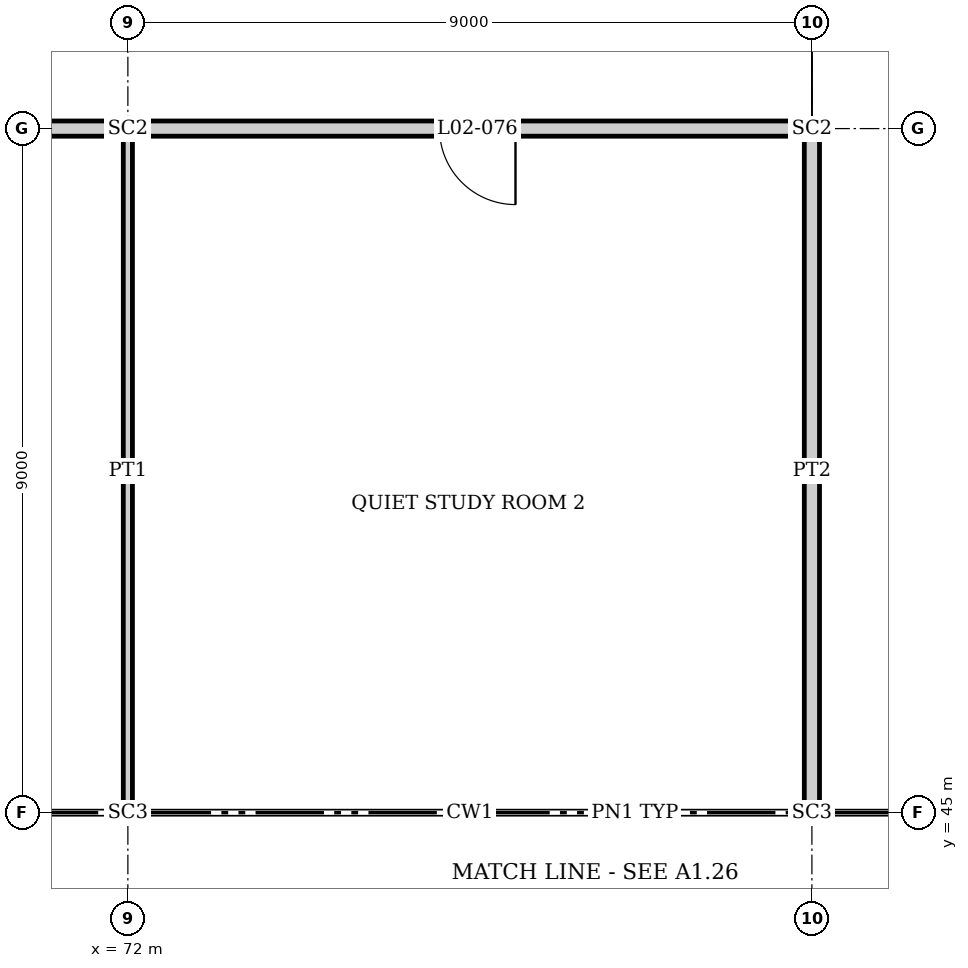
"""IFC4 building model, lengths in metres.
Left out: names, types, materials, properties, quantities, classifications, styles, units other than length and angle.
Written with IfcOpenShell. Run it as: python <this file> out.ifc"""

import sys

from ifc_helpers import new_model, si_unit, direction, frame, frame_2d, origin, origin_2d, place, context, subcontext, project, spatial, rectangle, i_section, extrude, element, fill, save


model = new_model("IFC4")
c1 = context("Model", 3, precision=1e-05, world=origin(), true_north=direction((0.0, 1.0)))
c2 = subcontext(c1, "Body", "Model", "MODEL_VIEW")
j1 = project(units=[si_unit("LENGTHUNIT", "METRE"), si_unit("PLANEANGLEUNIT", "RADIAN")], contexts=[c1])
p1 = place(None, origin())
s1 = spatial("IfcSite", under=j1, at=p1, CompositionType="ELEMENT")
p2 = place(p1, origin())
s2 = spatial("IfcBuilding", under=s1, at=p2, CompositionType="ELEMENT")
p3 = place(p2, frame((0.0, 0.0, 10.5)))
s3 = spatial("IfcBuildingStorey", under=s2, at=p3, CompositionType="ELEMENT", Elevation=10.5)
p4 = place(p3, frame((72.0, 45.0, 0.0), z_axis=(0.0, 0.0, 1.0), x_axis=(0.0, 1.0, 0.0)))
e1 = element("IfcColumn", 1, at=p4, inside=s3, PredefinedType="COLUMN", context=c2, shape_type="SweptSolid", body=[
    extrude(i_section(OverallWidth=0.254, OverallDepth=0.254, WebThickness=0.009, FlangeThickness=0.014, at=origin_2d()), origin(), (0.0, 0.0, 1.0), 4.5),
])
p5 = place(p3, frame((72.0, 54.0, 0.0), z_axis=(0.0, 0.0, 1.0), x_axis=(0.0, 1.0, 0.0)))
e2 = element("IfcColumn", 2, at=p5, inside=s3, PredefinedType="COLUMN", context=c2, shape_type="SweptSolid", body=[
    extrude(i_section(OverallWidth=0.256, OverallDepth=0.26, WebThickness=0.01, FlangeThickness=0.017, at=origin_2d()), origin(), (0.0, 0.0, 1.0), 4.5),
])
p6 = place(p3, frame((81.0, 45.0, 0.0), z_axis=(0.0, 0.0, 1.0), x_axis=(0.0, 1.0, 0.0)))
e3 = element("IfcColumn", 3, at=p6, inside=s3, PredefinedType="COLUMN", context=c2, shape_type="SweptSolid", body=[
    extrude(i_section(OverallWidth=0.254, OverallDepth=0.254, WebThickness=0.009, FlangeThickness=0.014, at=origin_2d()), origin(), (0.0, 0.0, 1.0), 4.5),
])
p7 = place(p3, frame((81.0, 54.0, 0.0), z_axis=(0.0, 0.0, 1.0), x_axis=(0.0, 1.0, 0.0)))
e4 = element("IfcColumn", 4, at=p7, inside=s3, PredefinedType="COLUMN", context=c2, shape_type="SweptSolid", body=[
    extrude(i_section(OverallWidth=0.256, OverallDepth=0.26, WebThickness=0.01, FlangeThickness=0.017, at=origin_2d()), origin(), (0.0, 0.0, 1.0), 4.5),
])
p8 = place(p3, frame((63.0, 54.0, 0.0), z_axis=(0.0, 0.0, 1.0), x_axis=(1.0, 0.0, 0.0)))
e5 = element("IfcWall", 5, at=p8, inside=s3, PredefinedType="PARTITIONING", context=c2, shape_type="SweptSolid", body=[
    extrude(rectangle(XDim=8.87, YDim=0.2, at=frame_2d((4.435, 0.0))), origin(), (0.0, 0.0, 1.0), 3.738),
])
p9 = place(p8, frame((4.1, 0.0, 0.0)))
e6 = element("IfcOpeningElement", 6, at=p9, cuts=e5, PredefinedType="OPENING", context=c2, shape_type="SweptSolid", body=[
    extrude(rectangle(XDim=1.0, YDim=2.1, at=frame_2d((0.5, 1.05))), frame((0.0, 0.11, 0.0), z_axis=(0.0, -1.0, 0.0), x_axis=(1.0, 0.0, 0.0)), (0.0, 0.0, 1.0), 0.22),
])
p10 = place(p3, frame((72.13, 54.0, 0.0), z_axis=(0.0, 0.0, 1.0), x_axis=(1.0, 0.0, 0.0)))
e7 = element("IfcWall", 7, at=p10, inside=s3, PredefinedType="PARTITIONING", context=c2, shape_type="SweptSolid", body=[
    extrude(rectangle(XDim=8.74, YDim=0.2, at=frame_2d((4.37, 0.0))), origin(), (0.0, 0.0, 1.0), 3.738),
])
p11 = place(p10, frame((3.97, 0.0, 0.0)))
e8 = element("IfcOpeningElement", 8, at=p11, cuts=e7, PredefinedType="OPENING", context=c2, shape_type="SweptSolid", body=[
    extrude(rectangle(XDim=1.0, YDim=2.1, at=frame_2d((0.5, 1.05))), frame((0.0, 0.11, 0.0), z_axis=(0.0, -1.0, 0.0), x_axis=(1.0, 0.0, 0.0)), (0.0, 0.0, 1.0), 0.22),
])
p12 = place(p3, frame((72.0, 45.127, 0.0), z_axis=(0.0, 0.0, 1.0), x_axis=(0.0, 1.0, 0.0)))
e9 = element("IfcWall", 9, at=p12, inside=s3, PredefinedType="PARTITIONING", context=c2, shape_type="SweptSolid", body=[
    extrude(rectangle(XDim=8.743, YDim=0.12, at=frame_2d((4.372, 0.0))), origin(), (0.0, 0.0, 1.0), 3.998),
])
p13 = place(p3, frame((81.0, 45.127, 0.0), z_axis=(0.0, 0.0, 1.0), x_axis=(0.0, 1.0, 0.0)))
e10 = element("IfcWall", 10, at=p13, inside=s3, PredefinedType="PARTITIONING", context=c2, shape_type="SweptSolid", body=[
    extrude(rectangle(XDim=8.743, YDim=0.2, at=frame_2d((4.372, 0.0))), origin(), (0.0, 0.0, 1.0), 3.998),
])
p14 = place(p11, frame((1.0, 0.0, 0.0), z_axis=(0.0, 0.0, 1.0), x_axis=(-1.0, 0.0, 0.0)))
e11 = element("IfcDoor", 11, at=p14, inside=s3, OperationType="SINGLE_SWING_LEFT", PredefinedType="DOOR", context=c2, shape_type="SweptSolid", body=[
    extrude(rectangle(XDim=1.0, YDim=2.1, at=frame_2d((0.5, 1.05))), frame((0.0, 0.025, 0.0), z_axis=(0.0, -1.0, 0.0), x_axis=(1.0, 0.0, 0.0)), (0.0, 0.0, 1.0), 0.05),
])
fill(e8, e11)
save(model, sys.argv[1])
